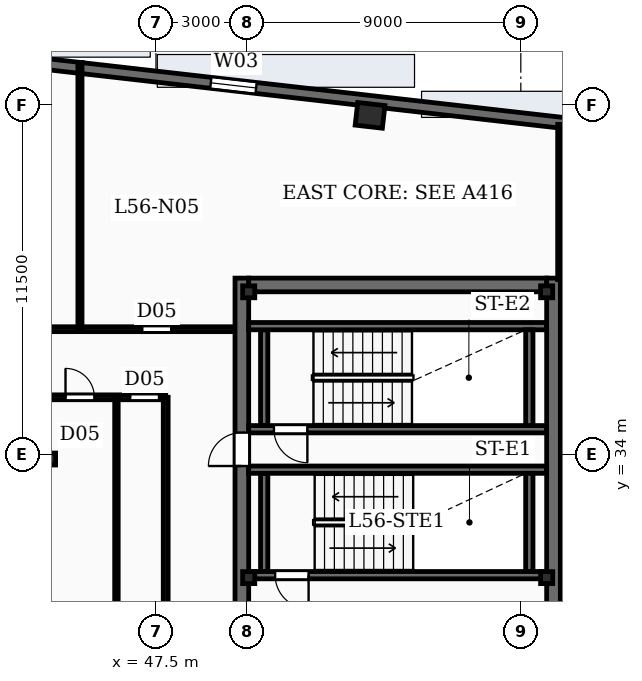
"""IFC4 building model, lengths in metres.
Left out: names, types, materials, properties, quantities, classifications, styles, units other than length and angle.
Written with IfcOpenShell. Run it as: python <this file> out.ifc"""

import sys

from ifc_helpers import new_model, si_unit, direction, frame, frame_2d, origin, origin_2d, place, context, subcontext, project, spatial, rectangle, i_section, extrude, element, fill, save


model = new_model("IFC4")
c1 = context("Model", 3, precision=1e-05, world=origin(), true_north=direction((0.0, 1.0)))
c2 = subcontext(c1, "Body", "Model", "MODEL_VIEW")
j1 = project(units=[si_unit("LENGTHUNIT", "METRE"), si_unit("PLANEANGLEUNIT", "RADIAN")], contexts=[c1])
p1 = place(None, origin())
s1 = spatial("IfcSite", under=j1, at=p1, CompositionType="ELEMENT")
p2 = place(p1, origin())
s2 = spatial("IfcBuilding", under=s1, at=p2, CompositionType="ELEMENT")
p3 = place(p2, frame((0.0, 0.0, 232.2)))
s3 = spatial("IfcBuildingStorey", under=s2, at=p3, CompositionType="ELEMENT", Elevation=232.2)
p4 = place(p3, frame((50.325, 19.0, -0.27), z_axis=(0.0, 0.0, 1.0), x_axis=(0.0, 1.0, 0.0)))
e1 = element("IfcWall", 1, at=p4, inside=s3, PredefinedType="SHEAR", context=c2, shape_type="SweptSolid", body=[
    extrude(rectangle(XDim=20.8, YDim=0.45, at=frame_2d((10.4, 0.0))), origin(), (0.0, 0.0, 1.0), 3.75),
])
p5 = place(p4, frame((2.5, 0.0, 0.27)))
e2 = element("IfcOpeningElement", 2, at=p5, cuts=e1, PredefinedType="OPENING", context=c2, shape_type="SweptSolid", body=[
    extrude(rectangle(XDim=1.05, YDim=2.15, at=frame_2d((0.525, 1.075))), frame((0.0, 0.235, 0.0), z_axis=(0.0, -1.0, 0.0), x_axis=(1.0, 0.0, 0.0)), (0.0, 0.0, 1.0), 0.47),
])
p6 = place(p4, frame((8.65, 0.0, 0.27)))
e3 = element("IfcOpeningElement", 3, at=p6, cuts=e1, PredefinedType="OPENING", context=c2, shape_type="SweptSolid", body=[
    extrude(rectangle(XDim=1.05, YDim=2.15, at=frame_2d((0.525, 1.075))), frame((0.0, 0.235, 0.0), z_axis=(0.0, -1.0, 0.0), x_axis=(1.0, 0.0, 0.0)), (0.0, 0.0, 1.0), 0.47),
])
p7 = place(p4, frame((14.62, 0.0, 0.27)))
e4 = element("IfcOpeningElement", 4, at=p7, cuts=e1, PredefinedType="OPENING", context=c2, shape_type="SweptSolid", body=[
    extrude(rectangle(XDim=1.1, YDim=2.15, at=frame_2d((0.55, 1.075))), frame((0.0, 0.235, 0.0), z_axis=(0.0, -1.0, 0.0), x_axis=(1.0, 0.0, 0.0)), (0.0, 0.0, 1.0), 0.47),
])
p8 = place(p3, frame((60.575, 19.0, -0.27), z_axis=(0.0, 0.0, 1.0), x_axis=(0.0, 1.0, 0.0)))
e5 = element("IfcWall", 5, at=p8, inside=s3, PredefinedType="SHEAR", context=c2, shape_type="SweptSolid", body=[
    extrude(rectangle(XDim=20.8, YDim=0.45, at=frame_2d((10.4, 0.0))), origin(), (0.0, 0.0, 1.0), 3.75),
])
p9 = place(p3, frame((50.55, 39.575, -0.27), z_axis=(0.0, 0.0, 1.0), x_axis=(1.0, 0.0, 0.0)))
e6 = element("IfcWall", 6, at=p9, inside=s3, PredefinedType="SHEAR", context=c2, shape_type="SweptSolid", body=[
    extrude(rectangle(XDim=9.8, YDim=0.45, at=frame_2d((4.9, 0.0))), origin(), (0.0, 0.0, 1.0), 3.75),
])
for number, where, z_axis, x_axis in (
    (7, (50.55, 29.95, -0.27), (0.0, 0.0, 1.0), (1.0, 0.0, 0.0)),
    (8, (60.35, 29.95, -0.27), (0.0, 0.0, 1.0), (1.0, 0.0, 0.0)),
    (9, (50.55, 39.35, -0.27), (0.0, 0.0, 1.0), (1.0, 0.0, 0.0)),
    (10, (60.35, 39.35, -0.27), (0.0, 0.0, 1.0), (1.0, 0.0, 0.0)),
    (11, (44.0, 33.85, -0.27), (0.0, 0.0, 1.0), (1.0, 0.0, 0.0)),
):
    element("IfcColumn", number, at=place(p3, frame(where, z_axis=z_axis, x_axis=x_axis)), inside=s3, PredefinedType="COLUMN", context=c2, shape_type="SweptSolid", body=[
        extrude(i_section(OverallWidth=0.399, OverallDepth=0.393, WebThickness=0.023, FlangeThickness=0.037, FilletRadius=0.02, at=origin_2d()), origin(), (0.0, 0.0, 1.0), 3.75),
    ])
p10 = place(p3, frame((54.542, 45.154, -0.27), z_axis=(0.0, 0.0, 1.0), x_axis=(0.993571855677, -0.113203213768, 0.0)))
e12 = element("IfcColumn", 12, at=p10, inside=s3, PredefinedType="COLUMN", context=c2, shape_type="SweptSolid", body=[
    extrude(rectangle(XDim=0.9, YDim=0.75, at=origin_2d()), origin(), (0.0, 0.0, 1.0), 3.75),
])
p11 = place(p3, frame((19.894, 49.575, 0.0), z_axis=(0.0, 0.0, 1.0), x_axis=(0.993571439016, -0.113206870688, 0.0)))
e13 = element("IfcWall", 13, at=p11, inside=s3, PredefinedType="SOLIDWALL", context=c2, shape_type="SweptSolid", body=[
    extrude(rectangle(XDim=46.8, YDim=0.36, at=frame_2d((23.4, 0.0))), origin(), (0.0, 0.0, 1.0), 3.48),
])
p12 = place(p11, frame((2.6, 0.0, 0.88)))
e14 = element("IfcOpeningElement", 14, at=p12, cuts=e13, PredefinedType="OPENING", context=c2, shape_type="SweptSolid", body=[
    extrude(rectangle(XDim=1.5, YDim=2.05, at=frame_2d((0.75, 1.025))), frame((0.0, 0.19, 0.0), z_axis=(0.0, -1.0, 0.0), x_axis=(1.0, 0.0, 0.0)), (0.0, 0.0, 1.0), 0.38),
])
p13 = place(p11, frame((29.6, 0.0, 0.88)))
e15 = element("IfcOpeningElement", 15, at=p13, cuts=e13, PredefinedType="OPENING", context=c2, shape_type="SweptSolid", body=[
    extrude(rectangle(XDim=1.5, YDim=2.05, at=frame_2d((0.75, 1.025))), frame((0.0, 0.19, 0.0), z_axis=(0.0, -1.0, 0.0), x_axis=(1.0, 0.0, 0.0)), (0.0, 0.0, 1.0), 0.38),
])
p14 = place(p3, frame((60.35, 30.03, 0.0), z_axis=(0.0, 0.0, 1.0), x_axis=(-1.0, 0.0, 0.0)))
e16 = element("IfcWall", 16, at=p14, inside=s3, PredefinedType="SOLIDWALL", context=c2, shape_type="SweptSolid", body=[
    extrude(rectangle(XDim=9.8, YDim=0.24, at=frame_2d((4.9, 0.0))), origin(), (0.0, 0.0, 1.0), 3.48),
])
p15 = place(p14, frame((7.83, 0.0, 0.0)))
e17 = element("IfcOpeningElement", 17, at=p15, cuts=e16, PredefinedType="OPENING", context=c2, shape_type="SweptSolid", body=[
    extrude(rectangle(XDim=1.1, YDim=2.15, at=frame_2d((0.55, 1.075))), frame((0.0, 0.13, 0.0), z_axis=(0.0, -1.0, 0.0), x_axis=(1.0, 0.0, 0.0)), (0.0, 0.0, 1.0), 0.26),
])
p16 = place(p3, frame((50.55, 33.5, 0.0), z_axis=(0.0, 0.0, 1.0), x_axis=(1.0, 0.0, 0.0)))
e18 = element("IfcWall", 18, at=p16, inside=s3, PredefinedType="SOLIDWALL", context=c2, shape_type="SweptSolid", body=[
    extrude(rectangle(XDim=9.8, YDim=0.24, at=frame_2d((4.9, 0.0))), origin(), (0.0, 0.0, 1.0), 3.48),
])
for number, where, z_axis, x_axis in (
    (19, (51.06, 30.15, 0.0), (0.0, 0.0, 1.0), (0.0, 1.0, 0.0)),
    (20, (59.78, 30.15, 0.0), (0.0, 0.0, 1.0), (0.0, 1.0, 0.0)),
):
    element("IfcWall", number, at=place(p3, frame(where, z_axis=z_axis, x_axis=x_axis)), inside=s3, PredefinedType="SOLIDWALL", context=c2, shape_type="SweptSolid", body=[
        extrude(rectangle(XDim=3.23, YDim=0.24, at=frame_2d((1.615, 0.0))), origin(), (0.0, 0.0, 1.0), 3.48),
    ])
p17 = place(p3, frame((60.35, 34.83, 0.0), z_axis=(0.0, 0.0, 1.0), x_axis=(-1.0, 0.0, 0.0)))
e21 = element("IfcWall", 21, at=p17, inside=s3, PredefinedType="SOLIDWALL", context=c2, shape_type="SweptSolid", body=[
    extrude(rectangle(XDim=9.8, YDim=0.24, at=frame_2d((4.9, 0.0))), origin(), (0.0, 0.0, 1.0), 3.48),
])
p18 = place(p17, frame((7.87, 0.0, 0.0)))
e22 = element("IfcOpeningElement", 22, at=p18, cuts=e21, PredefinedType="OPENING", context=c2, shape_type="SweptSolid", body=[
    extrude(rectangle(XDim=1.1, YDim=2.15, at=frame_2d((0.55, 1.075))), frame((0.0, 0.13, 0.0), z_axis=(0.0, -1.0, 0.0), x_axis=(1.0, 0.0, 0.0)), (0.0, 0.0, 1.0), 0.26),
])
p19 = place(p3, frame((50.55, 38.22, 0.0), z_axis=(0.0, 0.0, 1.0), x_axis=(1.0, 0.0, 0.0)))
e23 = element("IfcWall", 23, at=p19, inside=s3, PredefinedType="SOLIDWALL", context=c2, shape_type="SweptSolid", body=[
    extrude(rectangle(XDim=9.8, YDim=0.24, at=frame_2d((4.9, 0.0))), origin(), (0.0, 0.0, 1.0), 3.48),
])
for number, where, z_axis, x_axis in (
    (24, (51.06, 34.95, 0.0), (0.0, 0.0, 1.0), (0.0, 1.0, 0.0)),
    (25, (59.78, 34.95, 0.0), (0.0, 0.0, 1.0), (0.0, 1.0, 0.0)),
):
    element("IfcWall", number, at=place(p3, frame(where, z_axis=z_axis, x_axis=x_axis)), inside=s3, PredefinedType="SOLIDWALL", context=c2, shape_type="SweptSolid", body=[
        extrude(rectangle(XDim=3.15, YDim=0.24, at=frame_2d((1.575, 0.0))), origin(), (0.0, 0.0, 1.0), 3.48),
    ])
p20 = place(p3, frame((45.0, 38.12, 0.0), z_axis=(0.0, 0.0, 1.0), x_axis=(0.0, 1.0, 0.0)))
e26 = element("IfcWall", 26, at=p20, inside=s3, PredefinedType="PARTITIONING", context=c2, shape_type="SweptSolid", body=[
    extrude(rectangle(XDim=8.775, YDim=0.135, at=frame_2d((4.388, 0.0))), origin(), (0.0, 0.0, 1.0), 2.54),
])
p21 = place(p3, frame((60.78, 39.75, 0.0), z_axis=(0.0, 0.0, 1.0), x_axis=(0.0, 1.0, 0.0)))
e27 = element("IfcWall", 27, at=p21, inside=s3, PredefinedType="PARTITIONING", context=c2, shape_type="SweptSolid", body=[
    extrude(rectangle(XDim=5.106, YDim=0.135, at=frame_2d((2.553, 0.0))), origin(), (0.0, 0.0, 1.0), 2.54),
])
p22 = place(p3, frame((24.82, 38.12, 0.0), z_axis=(0.0, 0.0, 1.0), x_axis=(1.0, 0.0, 0.0)))
e28 = element("IfcWall", 28, at=p22, inside=s3, PredefinedType="PARTITIONING", context=c2, shape_type="SweptSolid", body=[
    extrude(rectangle(XDim=25.26, YDim=0.16, at=frame_2d((12.63, 0.0))), origin(), (0.0, 0.0, 1.0), 2.54),
])
p23 = place(p22, frame((1.88, 0.0, 0.0)))
e29 = element("IfcOpeningElement", 29, at=p23, cuts=e28, PredefinedType="OPENING", context=c2, shape_type="SweptSolid", body=[
    extrude(rectangle(XDim=0.95, YDim=2.15, at=frame_2d((0.475, 1.075))), frame((0.0, 0.09, 0.0), z_axis=(0.0, -1.0, 0.0), x_axis=(1.0, 0.0, 0.0)), (0.0, 0.0, 1.0), 0.18),
])
p24 = place(p22, frame((7.555, 0.0, 0.0)))
e30 = element("IfcOpeningElement", 30, at=p24, cuts=e28, PredefinedType="OPENING", context=c2, shape_type="SweptSolid", body=[
    extrude(rectangle(XDim=0.95, YDim=2.15, at=frame_2d((0.475, 1.075))), frame((0.0, 0.09, 0.0), z_axis=(0.0, -1.0, 0.0), x_axis=(1.0, 0.0, 0.0)), (0.0, 0.0, 1.0), 0.18),
])
p25 = place(p22, frame((11.855, 0.0, 0.0)))
e31 = element("IfcOpeningElement", 31, at=p25, cuts=e28, PredefinedType="OPENING", context=c2, shape_type="SweptSolid", body=[
    extrude(rectangle(XDim=0.95, YDim=2.15, at=frame_2d((0.475, 1.075))), frame((0.0, 0.09, 0.0), z_axis=(0.0, -1.0, 0.0), x_axis=(1.0, 0.0, 0.0)), (0.0, 0.0, 1.0), 0.18),
])
p26 = place(p22, frame((16.855, 0.0, 0.0)))
e32 = element("IfcOpeningElement", 32, at=p26, cuts=e28, PredefinedType="OPENING", context=c2, shape_type="SweptSolid", body=[
    extrude(rectangle(XDim=0.95, YDim=2.15, at=frame_2d((0.475, 1.075))), frame((0.0, 0.09, 0.0), z_axis=(0.0, -1.0, 0.0), x_axis=(1.0, 0.0, 0.0)), (0.0, 0.0, 1.0), 0.18),
])
p27 = place(p22, frame((22.23, 0.0, 0.0)))
e33 = element("IfcOpeningElement", 33, at=p27, cuts=e28, PredefinedType="OPENING", context=c2, shape_type="SweptSolid", body=[
    extrude(rectangle(XDim=0.95, YDim=2.15, at=frame_2d((0.475, 1.075))), frame((0.0, 0.09, 0.0), z_axis=(0.0, -1.0, 0.0), x_axis=(1.0, 0.0, 0.0)), (0.0, 0.0, 1.0), 0.18),
])
p28 = place(p3, frame((46.2, 15.38, 0.0), z_axis=(0.0, 0.0, 1.0), x_axis=(0.0, 1.0, 0.0)))
e34 = element("IfcWall", 34, at=p28, inside=s3, PredefinedType="PARTITIONING", context=c2, shape_type="SweptSolid", body=[
    extrude(rectangle(XDim=20.5, YDim=0.115, at=frame_2d((10.25, 0.0))), origin(), (0.0, 0.0, 1.0), 2.54),
])
p29 = place(p3, frame((27.08, 35.88, 0.0), z_axis=(0.0, 0.0, 1.0), x_axis=(1.0, 0.0, 0.0)))
e35 = element("IfcWall", 35, at=p29, inside=s3, PredefinedType="PARTITIONING", context=c2, shape_type="SweptSolid", body=[
    extrude(rectangle(XDim=20.74, YDim=0.16, at=frame_2d((10.37, 0.0))), origin(), (0.0, 0.0, 1.0), 2.54),
])
p30 = place(p29, frame((0.895, 0.0, 0.0)))
e36 = element("IfcOpeningElement", 36, at=p30, cuts=e35, PredefinedType="OPENING", context=c2, shape_type="SweptSolid", body=[
    extrude(rectangle(XDim=0.95, YDim=2.15, at=frame_2d((0.475, 1.075))), frame((0.0, 0.09, 0.0), z_axis=(0.0, -1.0, 0.0), x_axis=(1.0, 0.0, 0.0)), (0.0, 0.0, 1.0), 0.18),
])
p31 = place(p29, frame((5.295, 0.0, 0.0)))
e37 = element("IfcOpeningElement", 37, at=p31, cuts=e35, PredefinedType="OPENING", context=c2, shape_type="SweptSolid", body=[
    extrude(rectangle(XDim=0.95, YDim=2.15, at=frame_2d((0.475, 1.075))), frame((0.0, 0.09, 0.0), z_axis=(0.0, -1.0, 0.0), x_axis=(1.0, 0.0, 0.0)), (0.0, 0.0, 1.0), 0.18),
])
p32 = place(p29, frame((9.295, 0.0, 0.0)))
e38 = element("IfcOpeningElement", 38, at=p32, cuts=e35, PredefinedType="OPENING", context=c2, shape_type="SweptSolid", body=[
    extrude(rectangle(XDim=0.95, YDim=2.15, at=frame_2d((0.475, 1.075))), frame((0.0, 0.09, 0.0), z_axis=(0.0, -1.0, 0.0), x_axis=(1.0, 0.0, 0.0)), (0.0, 0.0, 1.0), 0.18),
])
p33 = place(p29, frame((13.945, 0.0, 0.0)))
e39 = element("IfcOpeningElement", 39, at=p33, cuts=e35, PredefinedType="OPENING", context=c2, shape_type="SweptSolid", body=[
    extrude(rectangle(XDim=0.95, YDim=2.15, at=frame_2d((0.475, 1.075))), frame((0.0, 0.09, 0.0), z_axis=(0.0, -1.0, 0.0), x_axis=(1.0, 0.0, 0.0)), (0.0, 0.0, 1.0), 0.18),
])
p34 = place(p29, frame((17.445, 0.0, 0.0)))
e40 = element("IfcOpeningElement", 40, at=p34, cuts=e35, PredefinedType="OPENING", context=c2, shape_type="SweptSolid", body=[
    extrude(rectangle(XDim=0.95, YDim=2.15, at=frame_2d((0.475, 1.075))), frame((0.0, 0.09, 0.0), z_axis=(0.0, -1.0, 0.0), x_axis=(1.0, 0.0, 0.0)), (0.0, 0.0, 1.0), 0.18),
])
p35 = place(p29, frame((19.57, 0.0, 0.0)))
e41 = element("IfcOpeningElement", 41, at=p35, cuts=e35, PredefinedType="OPENING", context=c2, shape_type="SweptSolid", body=[
    extrude(rectangle(XDim=0.95, YDim=2.15, at=frame_2d((0.475, 1.075))), frame((0.0, 0.09, 0.0), z_axis=(0.0, -1.0, 0.0), x_axis=(1.0, 0.0, 0.0)), (0.0, 0.0, 1.0), 0.18),
])
p36 = place(p3, frame((47.82, 15.38, 0.0), z_axis=(0.0, 0.0, 1.0), x_axis=(0.0, 1.0, 0.0)))
e42 = element("IfcWall", 42, at=p36, inside=s3, PredefinedType="PARTITIONING", context=c2, shape_type="SweptSolid", body=[
    extrude(rectangle(XDim=20.5, YDim=0.16, at=frame_2d((10.25, 0.0))), origin(), (0.0, 0.0, 1.0), 2.54),
])
p37 = place(p13, origin())
e43 = element("IfcWindow", 43, at=p37, inside=s3, PartitioningType="SINGLE_PANEL", PredefinedType="WINDOW", context=c2, shape_type="SweptSolid", body=[
    extrude(rectangle(XDim=1.5, YDim=2.05, at=frame_2d((0.75, 1.025))), frame((0.0, 0.03, 0.0), z_axis=(0.0, -1.0, 0.0), x_axis=(1.0, 0.0, 0.0)), (0.0, 0.0, 1.0), 0.06),
])
fill(e15, e43)
p38 = place(p7, origin())
e44 = element("IfcDoor", 44, at=p38, inside=s3, OperationType="SINGLE_SWING_LEFT", PredefinedType="DOOR", context=c2, shape_type="SweptSolid", body=[
    extrude(rectangle(XDim=1.1, YDim=2.15, at=frame_2d((0.55, 1.075))), frame((0.0, 0.025, 0.0), z_axis=(0.0, -1.0, 0.0), x_axis=(1.0, 0.0, 0.0)), (0.0, 0.0, 1.0), 0.05),
])
fill(e4, e44)
p39 = place(p15, origin())
e45 = element("IfcDoor", 45, at=p39, inside=s3, OperationType="SINGLE_SWING_LEFT", PredefinedType="DOOR", context=c2, shape_type="SweptSolid", body=[
    extrude(rectangle(XDim=1.1, YDim=2.15, at=frame_2d((0.55, 1.075))), frame((0.0, 0.025, 0.0), z_axis=(0.0, -1.0, 0.0), x_axis=(1.0, 0.0, 0.0)), (0.0, 0.0, 1.0), 0.05),
])
fill(e17, e45)
p40 = place(p18, origin())
e46 = element("IfcDoor", 46, at=p40, inside=s3, OperationType="SINGLE_SWING_LEFT", PredefinedType="DOOR", context=c2, shape_type="SweptSolid", body=[
    extrude(rectangle(XDim=1.1, YDim=2.15, at=frame_2d((0.55, 1.075))), frame((0.0, 0.025, 0.0), z_axis=(0.0, -1.0, 0.0), x_axis=(1.0, 0.0, 0.0)), (0.0, 0.0, 1.0), 0.05),
])
fill(e22, e46)
p41 = place(p27, origin())
e47 = element("IfcDoor", 47, at=p41, inside=s3, OperationType="SINGLE_SWING_RIGHT", PredefinedType="DOOR", context=c2, shape_type="SweptSolid", body=[
    extrude(rectangle(XDim=0.95, YDim=2.15, at=frame_2d((0.475, 1.075))), frame((0.0, 0.025, 0.0), z_axis=(0.0, -1.0, 0.0), x_axis=(1.0, 0.0, 0.0)), (0.0, 0.0, 1.0), 0.05),
])
fill(e33, e47)
p42 = place(p34, origin())
e48 = element("IfcDoor", 48, at=p42, inside=s3, OperationType="SINGLE_SWING_LEFT", PredefinedType="DOOR", context=c2, shape_type="SweptSolid", body=[
    extrude(rectangle(XDim=0.95, YDim=2.15, at=frame_2d((0.475, 1.075))), frame((0.0, 0.025, 0.0), z_axis=(0.0, -1.0, 0.0), x_axis=(1.0, 0.0, 0.0)), (0.0, 0.0, 1.0), 0.05),
])
fill(e40, e48)
p43 = place(p35, origin())
e49 = element("IfcDoor", 49, at=p43, inside=s3, OperationType="SINGLE_SWING_LEFT", PredefinedType="DOOR", context=c2, shape_type="SweptSolid", body=[
    extrude(rectangle(XDim=0.95, YDim=2.15, at=frame_2d((0.475, 1.075))), frame((0.0, 0.025, 0.0), z_axis=(0.0, -1.0, 0.0), x_axis=(1.0, 0.0, 0.0)), (0.0, 0.0, 1.0), 0.05),
])
fill(e41, e49)
save(model, sys.argv[1])
